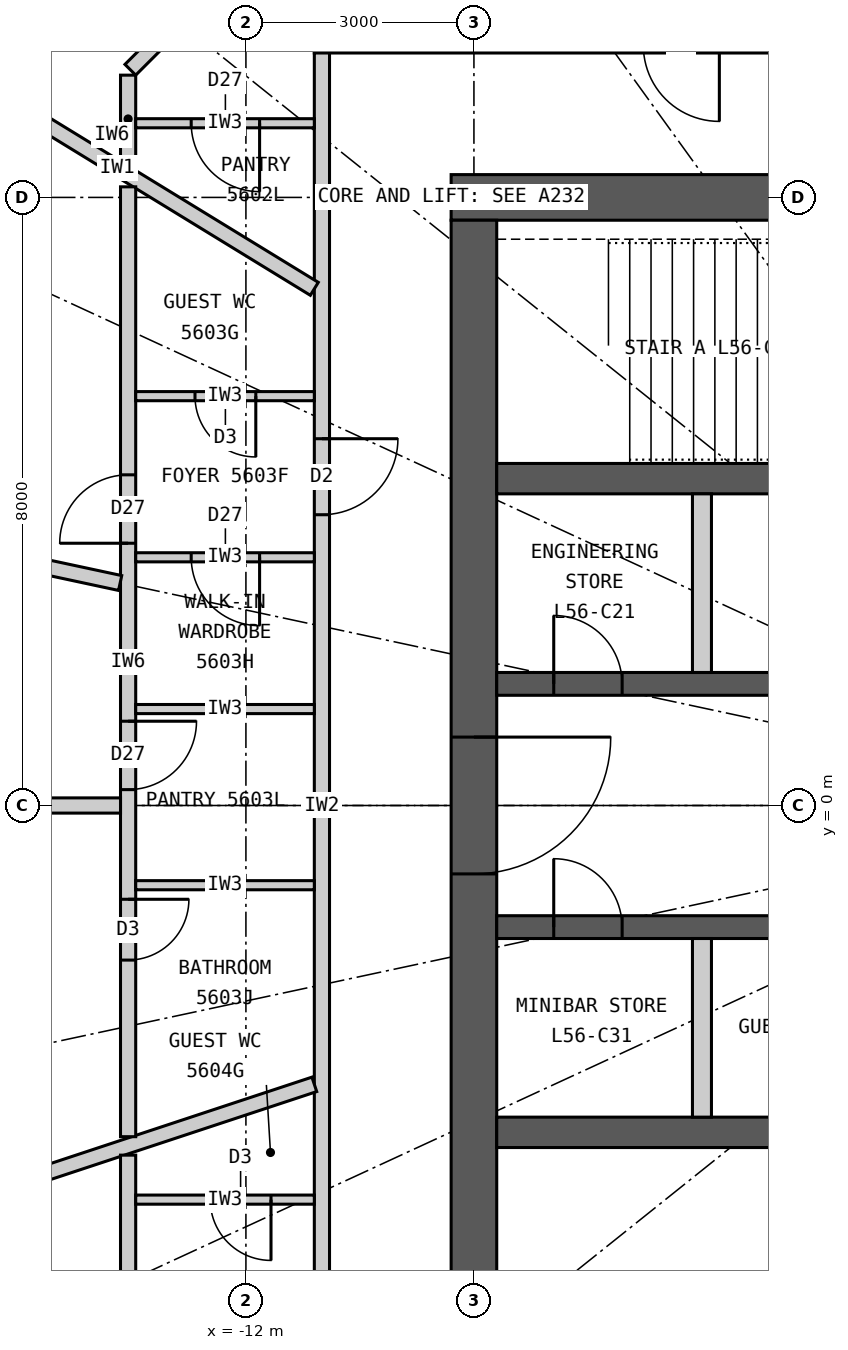
"""IFC4 building model, lengths in metres.
Left out: names, types, materials, properties, quantities, classifications, styles, units other than length and angle.
Written with IfcOpenShell. Run it as: python <this file> out.ifc"""

import sys

from ifc_helpers import new_model, si_unit, direction, frame, frame_2d, origin, place, context, subcontext, project, spatial, rectangle, extrude, element, fill, save


model = new_model("IFC4")
c1 = context("Model", 3, precision=1e-05, world=origin(), true_north=direction((0.0, 1.0)))
c2 = subcontext(c1, "Body", "Model", "MODEL_VIEW")
j1 = project(units=[si_unit("LENGTHUNIT", "METRE"), si_unit("PLANEANGLEUNIT", "RADIAN")], contexts=[c1])
p1 = place(None, origin())
s1 = spatial("IfcSite", under=j1, at=p1, CompositionType="ELEMENT")
p2 = place(p1, origin())
s2 = spatial("IfcBuilding", under=s1, at=p2, CompositionType="ELEMENT")
p3 = place(p2, frame((0.0, 0.0, 209.4)))
s3 = spatial("IfcBuildingStorey", under=s2, at=p3, CompositionType="ELEMENT", Elevation=209.4)
p4 = place(p3, frame((-9.3, 8.0, 0.0), z_axis=(0.0, 0.0, 1.0), x_axis=(1.0, 0.0, 0.0)))
e1 = element("IfcWall", 1, at=p4, inside=s3, PredefinedType="SHEAR", context=c2, shape_type="SweptSolid", body=[
    extrude(rectangle(XDim=18.6, YDim=0.6, at=frame_2d((9.3, 0.0))), origin(), (0.0, 0.0, 1.0), 3.3),
])
p5 = place(p4, frame((8.0, 0.0, 0.0)))
e2 = element("IfcOpeningElement", 2, at=p5, cuts=e1, PredefinedType="OPENING", context=c2, shape_type="SweptSolid", body=[
    extrude(rectangle(XDim=1.2, YDim=2.2, at=frame_2d((0.6, 1.1))), frame((0.0, 0.31, 0.0), z_axis=(0.0, -1.0, 0.0), x_axis=(1.0, 0.0, 0.0)), (0.0, 0.0, 1.0), 0.62),
])
p6 = place(p4, frame((15.6, 0.0, 0.0)))
e3 = element("IfcOpeningElement", 3, at=p6, cuts=e1, PredefinedType="OPENING", context=c2, shape_type="SweptSolid", body=[
    extrude(rectangle(XDim=0.9, YDim=2.2, at=frame_2d((0.45, 1.1))), frame((0.0, 0.31, 0.0), z_axis=(0.0, -1.0, 0.0), x_axis=(1.0, 0.0, 0.0)), (0.0, 0.0, 1.0), 0.62),
])
p7 = place(p3, frame((-9.0, 7.7, 0.0), z_axis=(0.0, 0.0, 1.0), x_axis=(0.0, -1.0, 0.0)))
e4 = element("IfcWall", 4, at=p7, inside=s3, PredefinedType="SHEAR", context=c2, shape_type="SweptSolid", body=[
    extrude(rectangle(XDim=15.4, YDim=0.6, at=frame_2d((7.7, 0.0))), origin(), (0.0, 0.0, 1.0), 3.3),
])
p8 = place(p7, frame((6.8, 0.0, 0.0)))
e5 = element("IfcOpeningElement", 5, at=p8, cuts=e4, PredefinedType="OPENING", context=c2, shape_type="SweptSolid", body=[
    extrude(rectangle(XDim=1.8, YDim=2.2, at=frame_2d((0.9, 1.1))), frame((0.0, 0.31, 0.0), z_axis=(0.0, -1.0, 0.0), x_axis=(1.0, 0.0, 0.0)), (0.0, 0.0, 1.0), 0.62),
])
p9 = place(p3, frame((-8.7, 4.3, 0.0), z_axis=(0.0, 0.0, 1.0), x_axis=(1.0, 0.0, 0.0)))
e6 = element("IfcWall", 6, at=p9, inside=s3, PredefinedType="SHEAR", context=c2, shape_type="SweptSolid", body=[
    extrude(rectangle(XDim=17.4, YDim=0.4, at=frame_2d((8.7, 0.0))), origin(), (0.0, 0.0, 1.0), 3.3),
])
p10 = place(p3, frame((-8.7, 1.6, 0.0), z_axis=(0.0, 0.0, 1.0), x_axis=(1.0, 0.0, 0.0)))
e7 = element("IfcWall", 7, at=p10, inside=s3, PredefinedType="SHEAR", context=c2, shape_type="SweptSolid", body=[
    extrude(rectangle(XDim=17.4, YDim=0.3, at=frame_2d((8.7, 0.0))), origin(), (0.0, 0.0, 1.0), 3.3),
])
p11 = place(p10, frame((12.65, 0.0, 0.0)))
e8 = element("IfcOpeningElement", 8, at=p11, cuts=e7, PredefinedType="OPENING", context=c2, shape_type="SweptSolid", body=[
    extrude(rectangle(XDim=1.1, YDim=2.2, at=frame_2d((0.55, 1.1))), frame((0.0, 0.16, 0.0), z_axis=(0.0, -1.0, 0.0), x_axis=(1.0, 0.0, 0.0)), (0.0, 0.0, 1.0), 0.32),
])
p12 = place(p10, frame((0.75, 0.0, 0.0)))
e9 = element("IfcOpeningElement", 9, at=p12, cuts=e7, PredefinedType="OPENING", context=c2, shape_type="SweptSolid", body=[
    extrude(rectangle(XDim=0.9, YDim=2.2, at=frame_2d((0.45, 1.1))), frame((0.0, 0.16, 0.0), z_axis=(0.0, -1.0, 0.0), x_axis=(1.0, 0.0, 0.0)), (0.0, 0.0, 1.0), 0.32),
])
p13 = place(p10, frame((6.75, 0.0, 0.0)))
e10 = element("IfcOpeningElement", 10, at=p13, cuts=e7, PredefinedType="OPENING", context=c2, shape_type="SweptSolid", body=[
    extrude(rectangle(XDim=0.9, YDim=2.2, at=frame_2d((0.45, 1.1))), frame((0.0, 0.16, 0.0), z_axis=(0.0, -1.0, 0.0), x_axis=(1.0, 0.0, 0.0)), (0.0, 0.0, 1.0), 0.32),
])
p14 = place(p3, frame((-8.7, -4.3, 0.0), z_axis=(0.0, 0.0, 1.0), x_axis=(1.0, 0.0, 0.0)))
e11 = element("IfcWall", 11, at=p14, inside=s3, PredefinedType="SHEAR", context=c2, shape_type="SweptSolid", body=[
    extrude(rectangle(XDim=17.4, YDim=0.4, at=frame_2d((8.7, 0.0))), origin(), (0.0, 0.0, 1.0), 3.3),
])
p15 = place(p3, frame((-8.7, -1.6, 0.0), z_axis=(0.0, 0.0, 1.0), x_axis=(1.0, 0.0, 0.0)))
e12 = element("IfcWall", 12, at=p15, inside=s3, PredefinedType="SHEAR", context=c2, shape_type="SweptSolid", body=[
    extrude(rectangle(XDim=17.4, YDim=0.3, at=frame_2d((8.7, 0.0))), origin(), (0.0, 0.0, 1.0), 3.3),
])
p16 = place(p15, frame((9.65, 0.0, 0.0)))
e13 = element("IfcOpeningElement", 13, at=p16, cuts=e12, PredefinedType="OPENING", context=c2, shape_type="SweptSolid", body=[
    extrude(rectangle(XDim=1.1, YDim=2.2, at=frame_2d((0.55, 1.1))), frame((0.0, 0.16, 0.0), z_axis=(0.0, -1.0, 0.0), x_axis=(1.0, 0.0, 0.0)), (0.0, 0.0, 1.0), 0.32),
])
p17 = place(p15, frame((12.4, 0.0, 0.0)))
e14 = element("IfcOpeningElement", 14, at=p17, cuts=e12, PredefinedType="OPENING", context=c2, shape_type="SweptSolid", body=[
    extrude(rectangle(XDim=1.6, YDim=2.4, at=frame_2d((0.8, 1.2))), frame((0.0, 0.16, 0.0), z_axis=(0.0, -1.0, 0.0), x_axis=(1.0, 0.0, 0.0)), (0.0, 0.0, 1.0), 0.32),
])
p18 = place(p15, frame((0.75, 0.0, 0.0)))
e15 = element("IfcOpeningElement", 15, at=p18, cuts=e12, PredefinedType="OPENING", context=c2, shape_type="SweptSolid", body=[
    extrude(rectangle(XDim=0.9, YDim=2.2, at=frame_2d((0.45, 1.1))), frame((0.0, 0.16, 0.0), z_axis=(0.0, -1.0, 0.0), x_axis=(1.0, 0.0, 0.0)), (0.0, 0.0, 1.0), 0.32),
])
p19 = place(p15, frame((5.25, 0.0, 0.0)))
e16 = element("IfcOpeningElement", 16, at=p19, cuts=e12, PredefinedType="OPENING", context=c2, shape_type="SweptSolid", body=[
    extrude(rectangle(XDim=0.9, YDim=2.2, at=frame_2d((0.45, 1.1))), frame((0.0, 0.16, 0.0), z_axis=(0.0, -1.0, 0.0), x_axis=(1.0, 0.0, 0.0)), (0.0, 0.0, 1.0), 0.32),
])
for number, where, z_axis, x_axis in (
    (17, (-6.0, 1.75, 0.0), (0.0, 0.0, 1.0), (0.0, 1.0, 0.0)),
    (18, (-6.0, -4.1, 0.0), (0.0, 0.0, 1.0), (0.0, 1.0, 0.0)),
):
    element("IfcWall", number, at=place(p3, frame(where, z_axis=z_axis, x_axis=x_axis)), inside=s3, PredefinedType="PARTITIONING", context=c2, shape_type="SweptSolid", body=[
        extrude(rectangle(XDim=2.35, YDim=0.25, at=frame_2d((1.175, 0.0))), origin(), (0.0, 0.0, 1.0), 3.3),
    ])
p20 = place(p3, frame((-11.1, 10.0, 0.0), z_axis=(0.0, 0.0, 1.0), x_axis=(1.0, 0.0, 0.0)))
e19 = element("IfcWall", 19, at=p20, inside=s3, PredefinedType="PARTITIONING", context=c2, shape_type="SweptSolid", body=[
    extrude(rectangle(XDim=22.2, YDim=0.2, at=frame_2d((11.1, 0.0))), origin(), (0.0, 0.0, 1.0), 3.12),
])
p21 = place(p20, frame((20.9, 0.0, 0.0)))
e20 = element("IfcOpeningElement", 20, at=p21, cuts=e19, PredefinedType="OPENING", context=c2, shape_type="SweptSolid", body=[
    extrude(rectangle(XDim=1.0, YDim=2.2, at=frame_2d((0.5, 1.1))), frame((0.0, 0.11, 0.0), z_axis=(0.0, -1.0, 0.0), x_axis=(1.0, 0.0, 0.0)), (0.0, 0.0, 1.0), 0.22),
])
p22 = place(p20, frame((4.329, 0.0, 0.0)))
e21 = element("IfcOpeningElement", 21, at=p22, cuts=e19, PredefinedType="OPENING", context=c2, shape_type="SweptSolid", body=[
    extrude(rectangle(XDim=1.0, YDim=2.2, at=frame_2d((0.5, 1.1))), frame((0.0, 0.11, 0.0), z_axis=(0.0, -1.0, 0.0), x_axis=(1.0, 0.0, 0.0)), (0.0, 0.0, 1.0), 0.22),
])
p23 = place(p3, frame((-11.0, 9.9, 0.0), z_axis=(0.0, 0.0, 1.0), x_axis=(0.0, -1.0, 0.0)))
e22 = element("IfcWall", 22, at=p23, inside=s3, PredefinedType="PARTITIONING", context=c2, shape_type="SweptSolid", body=[
    extrude(rectangle(XDim=19.8, YDim=0.2, at=frame_2d((9.9, 0.0))), origin(), (0.0, 0.0, 1.0), 3.12),
])
p24 = place(p23, frame((5.075, 0.0, 0.0)))
e23 = element("IfcOpeningElement", 23, at=p24, cuts=e22, PredefinedType="OPENING", context=c2, shape_type="SweptSolid", body=[
    extrude(rectangle(XDim=1.0, YDim=2.2, at=frame_2d((0.5, 1.1))), frame((0.0, 0.11, 0.0), z_axis=(0.0, -1.0, 0.0), x_axis=(1.0, 0.0, 0.0)), (0.0, 0.0, 1.0), 0.22),
])
p25 = place(p23, frame((18.645, 0.0, 0.0)))
e24 = element("IfcOpeningElement", 24, at=p25, cuts=e22, PredefinedType="OPENING", context=c2, shape_type="SweptSolid", body=[
    extrude(rectangle(XDim=1.0, YDim=2.2, at=frame_2d((0.5, 1.1))), frame((0.0, 0.11, 0.0), z_axis=(0.0, -1.0, 0.0), x_axis=(1.0, 0.0, 0.0)), (0.0, 0.0, 1.0), 0.22),
])
p26 = place(p3, frame((-11.1, 6.797, 0.0), z_axis=(0.0, 0.0, 1.0), x_axis=(-0.852799818179, 0.522237943963, 0.0)))
e25 = element("IfcWall", 25, at=p26, inside=s3, PredefinedType="PARTITIONING", context=c2, shape_type="SweptSolid", body=[
    extrude(rectangle(XDim=6.077, YDim=0.2, at=frame_2d((3.039, 0.0))), origin(), (0.0, 0.0, 1.0), 3.12),
])
p27 = place(p3, frame((-11.1, -3.669, 0.0), z_axis=(0.0, 0.0, 1.0), x_axis=(-0.949476668397, -0.313837627079, 0.0)))
e26 = element("IfcWall", 26, at=p27, inside=s3, PredefinedType="PARTITIONING", context=c2, shape_type="SweptSolid", body=[
    extrude(rectangle(XDim=8.339, YDim=0.2, at=frame_2d((4.169, 0.0))), origin(), (0.0, 0.0, 1.0), 3.12),
])
p28 = place(p3, frame((-10.679, 12.521, 0.0), z_axis=(0.0, 0.0, 1.0), x_axis=(-0.707106781187, -0.707106781187, 0.0)))
e27 = element("IfcWall", 27, at=p28, inside=s3, PredefinedType="PARTITIONING", context=c2, shape_type="SweptSolid", body=[
    extrude(rectangle(XDim=4.019, YDim=0.2, at=frame_2d((2.009, 0.0))), origin(), (0.0, 0.0, 1.0), 3.12),
])
p29 = place(p3, frame((-13.55, 9.609, 0.0), z_axis=(0.0, 0.0, 1.0), x_axis=(0.0, -1.0, 0.0)))
e28 = element("IfcWall", 28, at=p29, inside=s3, PredefinedType="PARTITIONING", context=c2, shape_type="SweptSolid", body=[
    extrude(rectangle(XDim=1.153, YDim=0.2, at=frame_2d((0.576, 0.0))), origin(), (0.0, 0.0, 1.0), 3.12),
])
p30 = place(p3, frame((-11.1, 8.976, 0.0), z_axis=(0.0, 0.0, 1.0), x_axis=(-1.0, 0.0, 0.0)))
e29 = element("IfcWall", 29, at=p30, inside=s3, PredefinedType="PARTITIONING", context=c2, shape_type="SweptSolid", body=[
    extrude(rectangle(XDim=2.35, YDim=0.12, at=frame_2d((1.175, 0.0))), origin(), (0.0, 0.0, 1.0), 3.12),
])
p31 = place(p30, frame((0.72, 0.0, 0.0)))
e30 = element("IfcOpeningElement", 30, at=p31, cuts=e29, PredefinedType="OPENING", context=c2, shape_type="SweptSolid", body=[
    extrude(rectangle(XDim=0.9, YDim=2.1, at=frame_2d((0.45, 1.05))), frame((0.0, 0.07, 0.0), z_axis=(0.0, -1.0, 0.0), x_axis=(1.0, 0.0, 0.0)), (0.0, 0.0, 1.0), 0.14),
])
p32 = place(p3, frame((-13.55, 8.139, 0.0), z_axis=(0.0, 0.0, 1.0), x_axis=(0.0, -1.0, 0.0)))
e31 = element("IfcWall", 31, at=p32, inside=s3, PredefinedType="PARTITIONING", context=c2, shape_type="SweptSolid", body=[
    extrude(rectangle(XDim=12.496, YDim=0.2, at=frame_2d((6.248, 0.0))), origin(), (0.0, 0.0, 1.0), 3.12),
])
p33 = place(p32, frame((7.031, 0.0, 0.0)))
e32 = element("IfcOpeningElement", 32, at=p33, cuts=e31, PredefinedType="OPENING", context=c2, shape_type="SweptSolid", body=[
    extrude(rectangle(XDim=0.9, YDim=2.1, at=frame_2d((0.45, 1.05))), frame((0.0, 0.11, 0.0), z_axis=(0.0, -1.0, 0.0), x_axis=(1.0, 0.0, 0.0)), (0.0, 0.0, 1.0), 0.22),
])
p34 = place(p32, frame((9.373, 0.0, 0.0)))
e33 = element("IfcOpeningElement", 33, at=p34, cuts=e31, PredefinedType="OPENING", context=c2, shape_type="SweptSolid", body=[
    extrude(rectangle(XDim=0.8, YDim=2.1, at=frame_2d((0.4, 1.05))), frame((0.0, 0.11, 0.0), z_axis=(0.0, -1.0, 0.0), x_axis=(1.0, 0.0, 0.0)), (0.0, 0.0, 1.0), 0.22),
])
p35 = place(p32, frame((3.789, 0.0, 0.0)))
e34 = element("IfcOpeningElement", 34, at=p35, cuts=e31, PredefinedType="OPENING", context=c2, shape_type="SweptSolid", body=[
    extrude(rectangle(XDim=0.9, YDim=2.1, at=frame_2d((0.45, 1.05))), frame((0.0, 0.11, 0.0), z_axis=(0.0, -1.0, 0.0), x_axis=(1.0, 0.0, 0.0)), (0.0, 0.0, 1.0), 0.22),
])
p36 = place(p3, frame((-13.655, 2.927, 0.0), z_axis=(0.0, 0.0, 1.0), x_axis=(-0.977790419294, 0.209585056568, 0.0)))
e35 = element("IfcWall", 35, at=p36, inside=s3, PredefinedType="PARTITIONING", context=c2, shape_type="SweptSolid", body=[
    extrude(rectangle(XDim=5.66, YDim=0.2, at=frame_2d((2.83, 0.0))), origin(), (0.0, 0.0, 1.0), 2.42),
])
p37 = place(p36, frame((1.82, 0.0, 0.0)))
e36 = element("IfcOpeningElement", 36, at=p37, cuts=e35, PredefinedType="OPENING", context=c2, shape_type="SweptSolid", body=[
    extrude(rectangle(XDim=0.9, YDim=2.1, at=frame_2d((0.45, 1.05))), frame((0.0, 0.11, 0.0), z_axis=(0.0, -1.0, 0.0), x_axis=(1.0, 0.0, 0.0)), (0.0, 0.0, 1.0), 0.22),
])
p38 = place(p3, frame((-13.65, 0.0, 0.0), z_axis=(0.0, 0.0, 1.0), x_axis=(-1.0, 0.0, 0.0)))
e37 = element("IfcWall", 37, at=p38, inside=s3, PredefinedType="PARTITIONING", context=c2, shape_type="SweptSolid", body=[
    extrude(rectangle(XDim=6.25, YDim=0.2, at=frame_2d((3.125, 0.0))), origin(), (0.0, 0.0, 1.0), 2.37),
])
p39 = place(p38, frame((2.07, 0.0, 0.0)))
e38 = element("IfcOpeningElement", 38, at=p39, cuts=e37, PredefinedType="OPENING", context=c2, shape_type="SweptSolid", body=[
    extrude(rectangle(XDim=0.9, YDim=2.1, at=frame_2d((0.45, 1.05))), frame((0.0, 0.11, 0.0), z_axis=(0.0, -1.0, 0.0), x_axis=(1.0, 0.0, 0.0)), (0.0, 0.0, 1.0), 0.22),
])
p40 = place(p3, frame((-11.1, 5.385, 0.0), z_axis=(0.0, 0.0, 1.0), x_axis=(-1.0, 0.0, 0.0)))
e39 = element("IfcWall", 39, at=p40, inside=s3, PredefinedType="PARTITIONING", context=c2, shape_type="SweptSolid", body=[
    extrude(rectangle(XDim=2.35, YDim=0.12, at=frame_2d((1.175, 0.0))), origin(), (0.0, 0.0, 1.0), 3.12),
])
p41 = place(p40, frame((0.77, 0.0, 0.0)))
e40 = element("IfcOpeningElement", 40, at=p41, cuts=e39, PredefinedType="OPENING", context=c2, shape_type="SweptSolid", body=[
    extrude(rectangle(XDim=0.8, YDim=2.1, at=frame_2d((0.4, 1.05))), frame((0.0, 0.07, 0.0), z_axis=(0.0, -1.0, 0.0), x_axis=(1.0, 0.0, 0.0)), (0.0, 0.0, 1.0), 0.14),
])
p42 = place(p3, frame((-11.1, 3.265, 0.0), z_axis=(0.0, 0.0, 1.0), x_axis=(-1.0, 0.0, 0.0)))
e41 = element("IfcWall", 41, at=p42, inside=s3, PredefinedType="PARTITIONING", context=c2, shape_type="SweptSolid", body=[
    extrude(rectangle(XDim=2.35, YDim=0.12, at=frame_2d((1.175, 0.0))), origin(), (0.0, 0.0, 1.0), 2.42),
])
p43 = place(p42, frame((0.72, 0.0, 0.0)))
e42 = element("IfcOpeningElement", 42, at=p43, cuts=e41, PredefinedType="OPENING", context=c2, shape_type="SweptSolid", body=[
    extrude(rectangle(XDim=0.9, YDim=2.1, at=frame_2d((0.45, 1.05))), frame((0.0, 0.07, 0.0), z_axis=(0.0, -1.0, 0.0), x_axis=(1.0, 0.0, 0.0)), (0.0, 0.0, 1.0), 0.14),
])
for number, where, z_axis, x_axis in (
    (43, (-11.1, 1.269, 0.0), (0.0, 0.0, 1.0), (-1.0, 0.0, 0.0)),
    (44, (-11.1, -1.049, 0.0), (0.0, 0.0, 1.0), (-1.0, 0.0, 0.0)),
):
    element("IfcWall", number, at=place(p3, frame(where, z_axis=z_axis, x_axis=x_axis)), inside=s3, PredefinedType="PARTITIONING", context=c2, shape_type="SweptSolid", body=[
        extrude(rectangle(XDim=2.35, YDim=0.12, at=frame_2d((1.175, 0.0))), origin(), (0.0, 0.0, 1.0), 3.12),
    ])
p44 = place(p3, frame((-13.55, -4.6, 0.0), z_axis=(0.0, 0.0, 1.0), x_axis=(0.0, -1.0, 0.0)))
e45 = element("IfcWall", 45, at=p44, inside=s3, PredefinedType="PARTITIONING", context=c2, shape_type="SweptSolid", body=[
    extrude(rectangle(XDim=5.009, YDim=0.2, at=frame_2d((2.504, 0.0))), origin(), (0.0, 0.0, 1.0), 3.12),
])
p45 = place(p44, frame((2.07, 0.0, 0.0)))
e46 = element("IfcOpeningElement", 46, at=p45, cuts=e45, PredefinedType="OPENING", context=c2, shape_type="SweptSolid", body=[
    extrude(rectangle(XDim=0.9, YDim=2.1, at=frame_2d((0.45, 1.05))), frame((0.0, 0.11, 0.0), z_axis=(0.0, -1.0, 0.0), x_axis=(1.0, 0.0, 0.0)), (0.0, 0.0, 1.0), 0.22),
])
p46 = place(p3, frame((-11.1, -5.185, 0.0), z_axis=(0.0, 0.0, 1.0), x_axis=(-1.0, 0.0, 0.0)))
e47 = element("IfcWall", 47, at=p46, inside=s3, PredefinedType="PARTITIONING", context=c2, shape_type="SweptSolid", body=[
    extrude(rectangle(XDim=2.35, YDim=0.12, at=frame_2d((1.175, 0.0))), origin(), (0.0, 0.0, 1.0), 3.12),
])
p47 = place(p46, frame((0.57, 0.0, 0.0)))
e48 = element("IfcOpeningElement", 48, at=p47, cuts=e47, PredefinedType="OPENING", context=c2, shape_type="SweptSolid", body=[
    extrude(rectangle(XDim=0.8, YDim=2.1, at=frame_2d((0.4, 1.05))), frame((0.0, 0.07, 0.0), z_axis=(0.0, -1.0, 0.0), x_axis=(1.0, 0.0, 0.0)), (0.0, 0.0, 1.0), 0.14),
])
p48 = place(p31, origin())
e49 = element("IfcDoor", 49, at=p48, inside=s3, OperationType="SINGLE_SWING_LEFT", PredefinedType="DOOR", context=c2, shape_type="SweptSolid", body=[
    extrude(rectangle(XDim=0.9, YDim=2.1, at=frame_2d((0.45, 1.05))), frame((0.0, 0.025, 0.0), z_axis=(0.0, -1.0, 0.0), x_axis=(1.0, 0.0, 0.0)), (0.0, 0.0, 1.0), 0.05),
])
fill(e30, e49)
p49 = place(p24, origin())
e50 = element("IfcDoor", 50, at=p49, inside=s3, OperationType="SINGLE_SWING_LEFT", PredefinedType="DOOR", context=c2, shape_type="SweptSolid", body=[
    extrude(rectangle(XDim=1.0, YDim=2.2, at=frame_2d((0.5, 1.1))), frame((0.0, 0.025, 0.0), z_axis=(0.0, -1.0, 0.0), x_axis=(1.0, 0.0, 0.0)), (0.0, 0.0, 1.0), 0.05),
])
fill(e23, e50)
p50 = place(p41, origin())
e51 = element("IfcDoor", 51, at=p50, inside=s3, OperationType="SINGLE_SWING_LEFT", PredefinedType="DOOR", context=c2, shape_type="SweptSolid", body=[
    extrude(rectangle(XDim=0.8, YDim=2.1, at=frame_2d((0.4, 1.05))), frame((0.0, 0.025, 0.0), z_axis=(0.0, -1.0, 0.0), x_axis=(1.0, 0.0, 0.0)), (0.0, 0.0, 1.0), 0.05),
])
fill(e40, e51)
p51 = place(p43, origin())
e52 = element("IfcDoor", 52, at=p51, inside=s3, OperationType="SINGLE_SWING_LEFT", PredefinedType="DOOR", context=c2, shape_type="SweptSolid", body=[
    extrude(rectangle(XDim=0.9, YDim=2.1, at=frame_2d((0.45, 1.05))), frame((0.0, 0.025, 0.0), z_axis=(0.0, -1.0, 0.0), x_axis=(1.0, 0.0, 0.0)), (0.0, 0.0, 1.0), 0.05),
])
fill(e42, e52)
p52 = place(p33, origin())
e53 = element("IfcDoor", 53, at=p52, inside=s3, OperationType="SINGLE_SWING_LEFT", PredefinedType="DOOR", context=c2, shape_type="SweptSolid", body=[
    extrude(rectangle(XDim=0.9, YDim=2.1, at=frame_2d((0.45, 1.05))), frame((0.0, 0.025, 0.0), z_axis=(0.0, -1.0, 0.0), x_axis=(1.0, 0.0, 0.0)), (0.0, 0.0, 1.0), 0.05),
])
fill(e32, e53)
p53 = place(p34, origin())
e54 = element("IfcDoor", 54, at=p53, inside=s3, OperationType="SINGLE_SWING_LEFT", PredefinedType="DOOR", context=c2, shape_type="SweptSolid", body=[
    extrude(rectangle(XDim=0.8, YDim=2.1, at=frame_2d((0.4, 1.05))), frame((0.0, 0.025, 0.0), z_axis=(0.0, -1.0, 0.0), x_axis=(1.0, 0.0, 0.0)), (0.0, 0.0, 1.0), 0.05),
])
fill(e33, e54)
p54 = place(p35, origin())
e55 = element("IfcDoor", 55, at=p54, inside=s3, OperationType="SINGLE_SWING_RIGHT", PredefinedType="DOOR", context=c2, shape_type="SweptSolid", body=[
    extrude(rectangle(XDim=0.9, YDim=2.1, at=frame_2d((0.45, 1.05))), frame((0.0, 0.025, 0.0), z_axis=(0.0, -1.0, 0.0), x_axis=(1.0, 0.0, 0.0)), (0.0, 0.0, 1.0), 0.05),
])
fill(e34, e55)
p55 = place(p47, origin())
e56 = element("IfcDoor", 56, at=p55, inside=s3, OperationType="SINGLE_SWING_LEFT", PredefinedType="DOOR", context=c2, shape_type="SweptSolid", body=[
    extrude(rectangle(XDim=0.8, YDim=2.1, at=frame_2d((0.4, 1.05))), frame((0.0, 0.025, 0.0), z_axis=(0.0, -1.0, 0.0), x_axis=(1.0, 0.0, 0.0)), (0.0, 0.0, 1.0), 0.05),
])
fill(e48, e56)
p56 = place(p12, origin())
e57 = element("IfcDoor", 57, at=p56, inside=s3, OperationType="SINGLE_SWING_LEFT", PredefinedType="DOOR", context=c2, shape_type="SweptSolid", body=[
    extrude(rectangle(XDim=0.9, YDim=2.2, at=frame_2d((0.45, 1.1))), frame((0.0, 0.025, 0.0), z_axis=(0.0, -1.0, 0.0), x_axis=(1.0, 0.0, 0.0)), (0.0, 0.0, 1.0), 0.05),
])
fill(e9, e57)
p57 = place(p18, origin())
e58 = element("IfcDoor", 58, at=p57, inside=s3, OperationType="SINGLE_SWING_LEFT", PredefinedType="DOOR", context=c2, shape_type="SweptSolid", body=[
    extrude(rectangle(XDim=0.9, YDim=2.2, at=frame_2d((0.45, 1.1))), frame((0.0, 0.025, 0.0), z_axis=(0.0, -1.0, 0.0), x_axis=(1.0, 0.0, 0.0)), (0.0, 0.0, 1.0), 0.05),
])
fill(e15, e58)
p58 = place(p8, origin())
e59 = element("IfcDoor", 59, at=p58, inside=s3, OperationType="DOUBLE_DOOR_DOUBLE_SWING", PredefinedType="DOOR", context=c2, shape_type="SweptSolid", body=[
    extrude(rectangle(XDim=1.8, YDim=2.2, at=frame_2d((0.9, 1.1))), frame((0.0, 0.025, 0.0), z_axis=(0.0, -1.0, 0.0), x_axis=(1.0, 0.0, 0.0)), (0.0, 0.0, 1.0), 0.05),
])
fill(e5, e59)
save(model, sys.argv[1])
